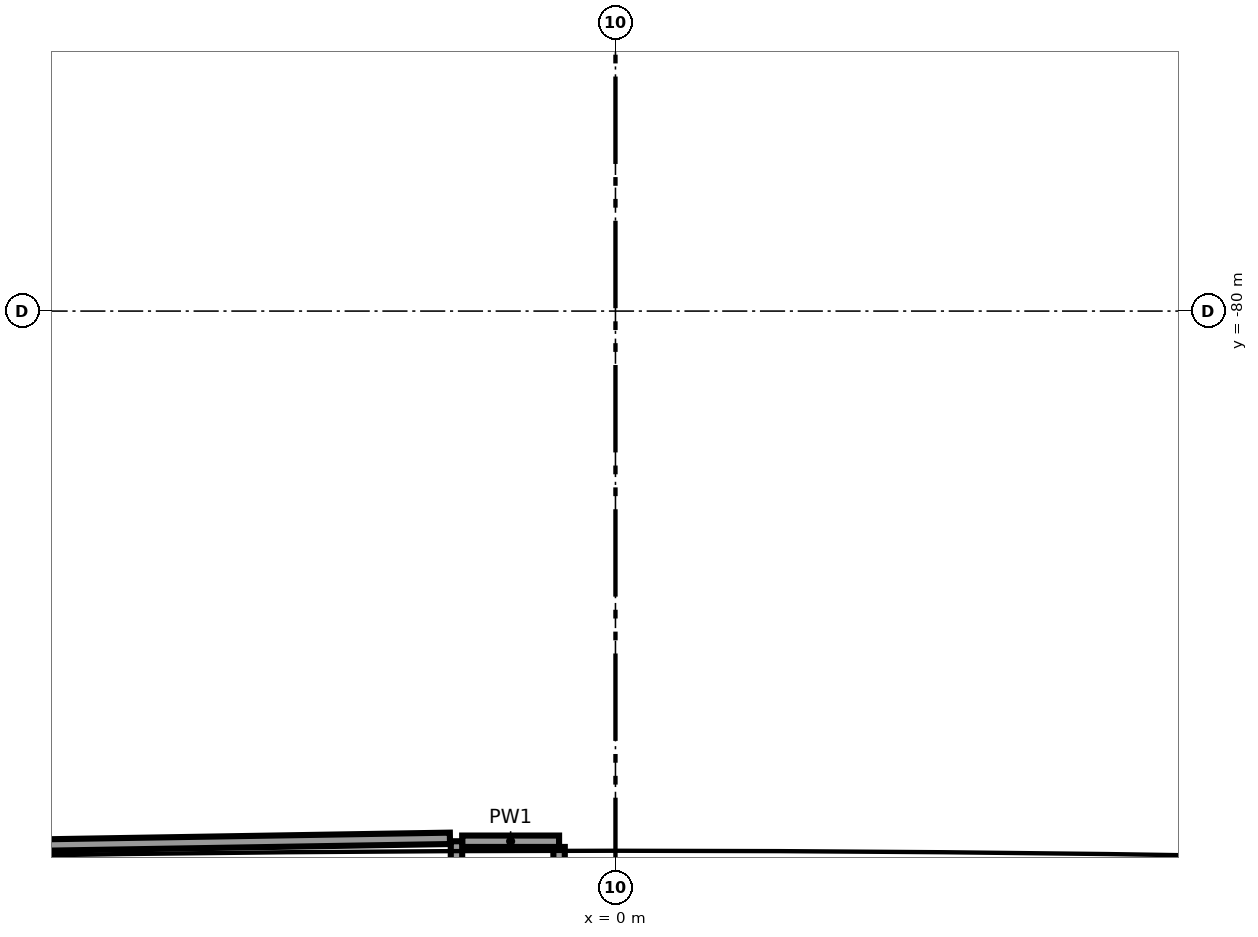
"""IFC4 building model, lengths in metres.
Left out: names, types, materials, properties, quantities, classifications, styles, units other than length and angle.
Written with IfcOpenShell. Run it as: python <this file> out.ifc"""

import sys

from ifc_helpers import new_model, si_unit, direction, frame, frame_2d, origin, place, context, subcontext, project, spatial, rectangle, extrude, element, save


model = new_model("IFC4")
c1 = context("Model", 3, precision=1e-05, world=origin(), true_north=direction((0.0, 1.0)))
c2 = subcontext(c1, "Body", "Model", "MODEL_VIEW")
j1 = project(units=[si_unit("LENGTHUNIT", "METRE"), si_unit("PLANEANGLEUNIT", "RADIAN")], contexts=[c1])
p1 = place(None, origin())
s1 = spatial("IfcSite", under=j1, at=p1, CompositionType="ELEMENT")
p2 = place(p1, origin())
s2 = spatial("IfcBuilding", under=s1, at=p2, CompositionType="ELEMENT")
p3 = place(p2, frame((0.0, 0.0, 24.0)))
s3 = spatial("IfcBuildingStorey", under=s2, at=p3, CompositionType="ELEMENT", Elevation=24.0)
for number, where, z_axis, x_axis in (
    (1, (-0.742, -88.325, 0.0), (0.0, 0.0, 1.0), (0.0, 1.0, 0.0)),
    (2, (-0.742, -86.975, 0.0), (0.0, 0.0, 1.0), (-1.0, 0.0, 0.0)),
    (3, (-2.092, -86.975, 0.0), (0.0, 0.0, 1.0), (0.0, -1.0, 0.0)),
):
    element("IfcWall", number, at=place(p3, frame(where, z_axis=z_axis, x_axis=x_axis)), inside=s3, PredefinedType="PARTITIONING", context=c2, shape_type="SweptSolid", body=[
        extrude(rectangle(XDim=1.275, YDim=0.15, at=frame_2d((0.637, 0.0))), origin(), (0.0, 0.0, 1.0), 5.4),
    ])
p4 = place(p3, frame((-2.178, -86.937, 0.0), z_axis=(0.0, 0.0, 1.0), x_axis=(-0.999864668818, -0.016451262841, 0.0)))
e4 = element("IfcWall", 4, at=p4, inside=s3, PredefinedType="PARTITIONING", context=c2, shape_type="SweptSolid", body=[
    extrude(rectangle(XDim=12.466, YDim=0.15, at=frame_2d((6.233, 0.0))), origin(), (0.0, 0.0, 1.0), 5.4),
])
save(model, sys.argv[1])
